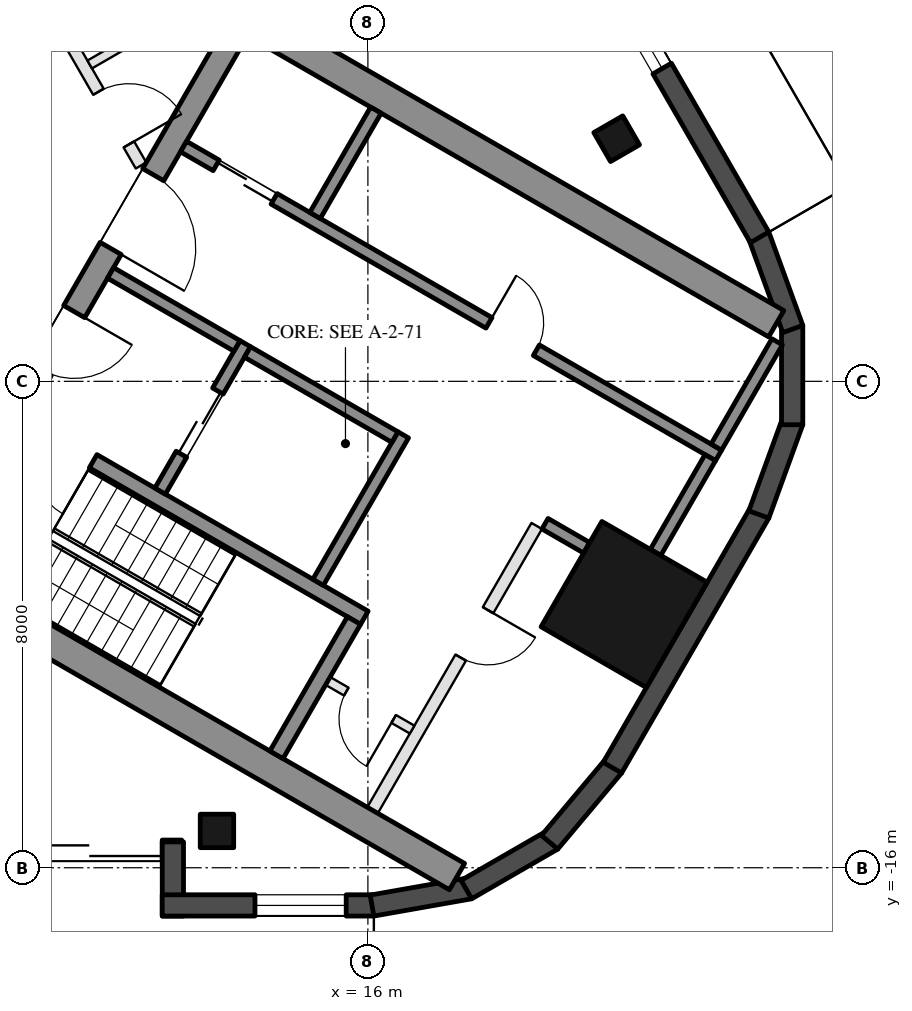
"""IFC4 building model, lengths in metres.
Left out: names, types, materials, properties, quantities, classifications, styles, units other than length and angle.
Written with IfcOpenShell. Run it as: python <this file> out.ifc"""

import sys

from ifc_helpers import new_model, si_unit, direction, frame, frame_2d, origin, origin_2d, place, context, subcontext, project, spatial, rectangle, hollow_rectangle, extrude, boolean, halfspace, element, fill, save


model = new_model("IFC4")
c1 = context("Model", 3, precision=1e-05, world=origin(), true_north=direction((0.0, 1.0)))
c2 = subcontext(c1, "Body", "Model", "MODEL_VIEW")
j1 = project(units=[si_unit("LENGTHUNIT", "METRE"), si_unit("PLANEANGLEUNIT", "RADIAN")], contexts=[c1])
p1 = place(None, origin())
s1 = spatial("IfcSite", under=j1, at=p1, CompositionType="ELEMENT")
p2 = place(p1, origin())
s2 = spatial("IfcBuilding", under=s1, at=p2, CompositionType="ELEMENT")
p3 = place(p2, frame((0.0, 0.0, 305.9)))
s3 = spatial("IfcBuildingStorey", under=s2, at=p3, CompositionType="ELEMENT", Elevation=305.9)
for number, where, z_axis, x_axis in (
    (1, (13.518, -15.395, 0.0), (0.0, 0.0, 1.0), (-1.0, 0.0, 0.0)),
    (2, (20.091, -4.01, 0.0), (0.0, 0.0, 1.0), (-0.5, 0.866, 0.0)),
):
    element("IfcColumn", number, at=place(p3, frame(where, z_axis=z_axis, x_axis=x_axis)), inside=s3, PredefinedType="COLUMN", context=c2, shape_type="SweptSolid", body=[
        boolean("DIFFERENCE", extrude(hollow_rectangle(XDim=0.55, YDim=0.55, WallThickness=0.025, at=origin_2d()), origin(), (0.0, 0.0, 1.0), 3.7), halfspace(frame((0.0, 0.0, 3.66), z_axis=(0.0, 0.0, 1.0), x_axis=(1.0, 0.0, 0.0)), False)),
    ])
p4 = place(p3, frame((20.214, -11.671, 0.0), z_axis=(0.0, 0.0, 1.0), x_axis=(0.5, 0.866025403784, 0.0)))
e3 = element("IfcColumn", 3, at=p4, inside=s3, PredefinedType="COLUMN", context=c2, shape_type="SweptSolid", body=[
    boolean("DIFFERENCE", extrude(hollow_rectangle(XDim=2.0, YDim=2.0, WallThickness=0.05, at=origin_2d()), origin(), (0.0, 0.0, 1.0), 3.7), halfspace(frame((0.0, 0.0, 3.587), z_axis=(0.0, 0.0, 1.0), x_axis=(1.0, 0.0, 0.0)), False)),
])
p5 = place(p3, frame((7.339, -15.719, 0.0), z_axis=(0.0, 0.0, 1.0), x_axis=(1.0, 0.0, 0.0)))
e4 = element("IfcWall", 4, at=p5, inside=s3, PredefinedType="SOLIDWALL", context=c2, shape_type="SweptSolid", body=[
    extrude(rectangle(XDim=5.599, YDim=0.35, at=frame_2d((2.799, 0.0))), origin(), (0.0, 0.0, 1.0), 3.55),
])
p6 = place(p5, frame((2.879, 0.0, 0.0)))
e5 = element("IfcOpeningElement", 5, at=p6, cuts=e4, PredefinedType="OPENING", context=c2, shape_type="SweptSolid", body=[
    extrude(rectangle(XDim=2.4, YDim=2.4, at=frame_2d((1.2, 1.2))), frame((0.0, 0.185, 0.0), z_axis=(0.0, -1.0, 0.0), x_axis=(1.0, 0.0, 0.0)), (0.0, 0.0, 1.0), 0.37),
])
p7 = place(p5, frame((0.831, 0.0, 0.3)))
e6 = element("IfcOpeningElement", 6, at=p7, cuts=e4, PredefinedType="OPENING", context=c2, shape_type="SweptSolid", body=[
    extrude(rectangle(XDim=1.7, YDim=2.65, at=frame_2d((0.85, 1.325))), frame((0.0, 0.185, 0.0), z_axis=(0.0, -1.0, 0.0), x_axis=(1.0, 0.0, 0.0)), (0.0, 0.0, 1.0), 0.37),
])
p8 = place(p3, frame((12.793, -15.575, 0.0), z_axis=(0.0, 0.0, 1.0), x_axis=(0.0, -1.0, 0.0)))
e7 = element("IfcWall", 7, at=p8, inside=s3, PredefinedType="SOLIDWALL", context=c2, shape_type="SweptSolid", body=[
    extrude(rectangle(XDim=1.22, YDim=0.35, at=frame_2d((0.61, 0.0))), origin(), (0.0, 0.0, 1.0), 3.55),
])
p9 = place(p3, frame((12.618, -16.62, 0.0), z_axis=(0.0, 0.0, 1.0), x_axis=(1.0, 0.0, 0.0)))
e8 = element("IfcWall", 8, at=p9, inside=s3, PredefinedType="SOLIDWALL", context=c2, shape_type="SweptSolid", body=[
    extrude(rectangle(XDim=3.48, YDim=0.35, at=frame_2d((1.74, 0.0))), origin(), (0.0, 0.0, 1.0), 3.55),
])
p10 = place(p9, frame((1.525, 0.0, 0.3)))
e9 = element("IfcOpeningElement", 9, at=p10, cuts=e8, PredefinedType="OPENING", context=c2, shape_type="SweptSolid", body=[
    extrude(rectangle(XDim=1.5, YDim=2.65, at=frame_2d((0.75, 1.325))), frame((0.0, 0.185, 0.0), z_axis=(0.0, -1.0, 0.0), x_axis=(1.0, 0.0, 0.0)), (0.0, 0.0, 1.0), 0.37),
])
p11 = place(p3, frame((16.068, -16.622, 0.0), z_axis=(0.0, 0.0, 1.0), x_axis=(0.98479107762, 0.173742721977, 0.0)))
e10 = element("IfcWall", 10, at=p11, inside=s3, PredefinedType="SOLIDWALL", context=c2, shape_type="SweptSolid", body=[
    extrude(rectangle(XDim=1.634, YDim=0.35, at=frame_2d((0.817, 0.0))), origin(), (0.0, 0.0, 1.0), 3.55),
])
p12 = place(p3, frame((17.62, -16.359, 0.0), z_axis=(0.0, 0.0, 1.0), x_axis=(0.866083589932, 0.499899205091, 0.0)))
e11 = element("IfcWall", 11, at=p12, inside=s3, PredefinedType="SOLIDWALL", context=c2, shape_type="SweptSolid", body=[
    extrude(rectangle(XDim=1.634, YDim=0.35, at=frame_2d((0.817, 0.0))), origin(), (0.0, 0.0, 1.0), 3.55),
])
p13 = place(p3, frame((18.989, -15.581, 0.0), z_axis=(0.0, 0.0, 1.0), x_axis=(0.642708448155, 0.766110860562, 0.0)))
e12 = element("IfcWall", 12, at=p13, inside=s3, PredefinedType="SOLIDWALL", context=c2, shape_type="SweptSolid", body=[
    extrude(rectangle(XDim=1.634, YDim=0.35, at=frame_2d((0.817, 0.0))), origin(), (0.0, 0.0, 1.0), 3.55),
])
p14 = place(p3, frame((20.021, -14.354, 0.0), z_axis=(0.0, 0.0, 1.0), x_axis=(0.500012048649, 0.866018447382, 0.0)))
e13 = element("IfcWall", 13, at=p14, inside=s3, PredefinedType="SOLIDWALL", context=c2, shape_type="SweptSolid", body=[
    extrude(rectangle(XDim=4.841, YDim=0.35, at=frame_2d((2.42, 0.0))), origin(), (0.0, 0.0, 1.0), 3.55),
])
for number, where, z_axis, x_axis in (
    (14, (22.429, -10.19, 0.0), (0.0, 0.0, 1.0), (0.342, 0.94, 0.0)),
    (15, (22.977, -8.714, 0.0), (0.0, 0.0, 1.0), (0.0, 1.0, 0.0)),
    (16, (22.988, -7.14, 0.0), (0.0, 0.0, 1.0), (-0.342, 0.94, 0.0)),
):
    element("IfcWall", number, at=place(p3, frame(where, z_axis=z_axis, x_axis=x_axis)), inside=s3, PredefinedType="SOLIDWALL", context=c2, shape_type="SweptSolid", body=[
        extrude(rectangle(XDim=1.634, YDim=0.35, at=frame_2d((0.817, 0.0))), origin(), (0.0, 0.0, 1.0), 3.55),
    ])
p15 = place(p3, frame((22.442, -5.632, 0.0), z_axis=(0.0, 0.0, 1.0), x_axis=(-0.499983205548, 0.866035099848, 0.0)))
e17 = element("IfcWall", 17, at=p15, inside=s3, PredefinedType="SOLIDWALL", context=c2, shape_type="SweptSolid", body=[
    extrude(rectangle(XDim=10.239, YDim=0.35, at=frame_2d((5.12, 0.0))), origin(), (0.0, 0.0, 1.0), 3.55),
])
p16 = place(p15, frame((5.32, 0.0, 0.0)))
e18 = element("IfcOpeningElement", 18, at=p16, cuts=e17, PredefinedType="OPENING", context=c2, shape_type="SweptSolid", body=[
    extrude(rectangle(XDim=2.4, YDim=2.4, at=frame_2d((1.2, 1.2))), frame((0.0, 0.185, 0.0), z_axis=(0.0, -1.0, 0.0), x_axis=(1.0, 0.0, 0.0)), (0.0, 0.0, 1.0), 0.37),
])
p17 = place(p15, frame((3.205, 0.0, 0.3)))
e19 = element("IfcOpeningElement", 19, at=p17, cuts=e17, PredefinedType="OPENING", context=c2, shape_type="SweptSolid", body=[
    extrude(rectangle(XDim=1.8, YDim=2.65, at=frame_2d((0.9, 1.325))), frame((0.0, 0.185, 0.0), z_axis=(0.0, -1.0, 0.0), x_axis=(1.0, 0.0, 0.0)), (0.0, 0.0, 1.0), 0.37),
])
for number, where, z_axis, x_axis in (
    (20, (8.547, -10.997, 0.0), (0.0, 0.0, 1.0), (0.866, -0.5, 0.0)),
    (21, (13.797, -1.903, 0.0), (0.0, 0.0, 1.0), (0.866, -0.5, 0.0)),
):
    element("IfcWall", number, at=place(p3, frame(where, z_axis=z_axis, x_axis=x_axis)), inside=s3, PredefinedType="SHEAR", context=c2, shape_type="SweptSolid", body=[
        extrude(rectangle(XDim=10.298, YDim=0.5, at=frame_2d((5.149, 0.0))), origin(), (0.0, 0.0, 1.0), 3.5),
    ])
p18 = place(p3, frame((8.845, -10.88, 0.0), z_axis=(0.0, 0.0, 1.0), x_axis=(0.500004234368, 0.866022959057, 0.0)))
e22 = element("IfcWall", 22, at=p18, inside=s3, PredefinedType="SHEAR", context=c2, shape_type="SweptSolid", body=[
    extrude(rectangle(XDim=10.0, YDim=0.4, at=frame_2d((5.0, 0.0))), origin(), (0.0, 0.0, 1.0), 3.5),
])
p19 = place(p18, frame((3.55, 0.0, 0.0)))
e23 = element("IfcOpeningElement", 23, at=p19, cuts=e22, PredefinedType="OPENING", context=c2, shape_type="SweptSolid", body=[
    extrude(rectangle(XDim=1.1, YDim=2.1, at=frame_2d((0.55, 1.05))), frame((0.0, 0.21, 0.0), z_axis=(0.0, -1.0, 0.0), x_axis=(1.0, 0.0, 0.0)), (0.0, 0.0, 1.0), 0.42),
])
p20 = place(p18, frame((5.85, 0.0, 0.0)))
e24 = element("IfcOpeningElement", 24, at=p20, cuts=e22, PredefinedType="OPENING", context=c2, shape_type="SweptSolid", body=[
    extrude(rectangle(XDim=1.4, YDim=2.1, at=frame_2d((0.7, 1.05))), frame((0.0, 0.21, 0.0), z_axis=(0.0, -1.0, 0.0), x_axis=(1.0, 0.0, 0.0)), (0.0, 0.0, 1.0), 0.42),
])
p21 = place(p3, frame((10.356, -8.664, 0.0), z_axis=(0.0, 0.0, 1.0), x_axis=(0.866028629588, -0.499994412703, 0.0)))
e25 = element("IfcWall", 25, at=p21, inside=s3, PredefinedType="SHEAR", context=c2, shape_type="SweptSolid", body=[
    extrude(rectangle(XDim=6.45, YDim=0.25, at=frame_2d((3.225, 0.0))), origin(), (0.0, 0.0, 1.0), 3.5),
])
p22 = place(p21, frame((0.3, 0.0, 0.0)))
e26 = element("IfcOpeningElement", 26, at=p22, cuts=e25, PredefinedType="OPENING", context=c2, shape_type="SweptSolid", body=[
    extrude(rectangle(XDim=1.0, YDim=2.1, at=frame_2d((0.5, 1.05))), frame((0.0, 0.135, 0.0), z_axis=(0.0, -1.0, 0.0), x_axis=(1.0, 0.0, 0.0)), (0.0, 0.0, 1.0), 0.27),
])
p23 = place(p3, frame((14.496, -14.143, 0.0), z_axis=(0.0, 0.0, 1.0), x_axis=(0.500062241894, 0.865989465428, 0.0)))
e27 = element("IfcWall", 27, at=p23, inside=s3, PredefinedType="SHEAR", context=c2, shape_type="SweptSolid", body=[
    extrude(rectangle(XDim=2.55, YDim=0.25, at=frame_2d((1.275, 0.0))), origin(), (0.0, 0.0, 1.0), 3.5),
])
p24 = place(p3, frame((15.181, -11.305, 0.0), z_axis=(0.0, 0.0, 1.0), x_axis=(0.49994636267, 0.866056369097, 0.0)))
e28 = element("IfcWall", 28, at=p24, inside=s3, PredefinedType="SHEAR", context=c2, shape_type="SweptSolid", body=[
    extrude(rectangle(XDim=2.8, YDim=0.2, at=frame_2d((1.4, 0.0))), origin(), (0.0, 0.0, 1.0), 3.5),
])
p25 = place(p3, frame((12.583, -9.805, 0.0), z_axis=(0.0, 0.0, 1.0), x_axis=(0.49994636267, 0.866056369097, 0.0)))
e29 = element("IfcWall", 29, at=p25, inside=s3, PredefinedType="SHEAR", context=c2, shape_type="SweptSolid", body=[
    extrude(rectangle(XDim=2.8, YDim=0.2, at=frame_2d((1.4, 0.0))), origin(), (0.0, 0.0, 1.0), 3.5),
])
p26 = place(p25, frame((0.7, 0.0, 0.0)))
e30 = element("IfcOpeningElement", 30, at=p26, cuts=e29, PredefinedType="OPENING", context=c2, shape_type="SweptSolid", body=[
    extrude(rectangle(XDim=1.2, YDim=2.1, at=frame_2d((0.6, 1.05))), frame((0.0, 0.11, 0.0), z_axis=(0.0, -1.0, 0.0), x_axis=(1.0, 0.0, 0.0)), (0.0, 0.0, 1.0), 0.22),
])
p27 = place(p3, frame((11.768, -6.217, 0.0), z_axis=(0.0, 0.0, 1.0), x_axis=(0.866050077142, -0.499957262057, 0.0)))
e31 = element("IfcWall", 31, at=p27, inside=s3, PredefinedType="SHEAR", context=c2, shape_type="SweptSolid", body=[
    extrude(rectangle(XDim=2.4, YDim=0.2, at=frame_2d((1.2, 0.0))), origin(), (0.0, 0.0, 1.0), 3.5),
])
p28 = place(p3, frame((14.02, -7.517, 0.0), z_axis=(0.0, 0.0, 1.0), x_axis=(0.866034573852, -0.49998411664, 0.0)))
e32 = element("IfcWall", 32, at=p28, inside=s3, PredefinedType="SHEAR", context=c2, shape_type="SweptSolid", body=[
    extrude(rectangle(XDim=2.8, YDim=0.2, at=frame_2d((1.4, 0.0))), origin(), (0.0, 0.0, 1.0), 3.5),
])
p29 = place(p3, frame((12.968, -4.138, 0.0), z_axis=(0.0, 0.0, 1.0), x_axis=(0.866028328073, -0.49999493495, 0.0)))
e33 = element("IfcWall", 33, at=p29, inside=s3, PredefinedType="SHEAR", context=c2, shape_type="SweptSolid", body=[
    extrude(rectangle(XDim=10.16, YDim=0.2, at=frame_2d((5.08, 0.0))), origin(), (0.0, 0.0, 1.0), 3.5),
])
p30 = place(p29, frame((0.62, 0.0, 0.0)))
e34 = element("IfcOpeningElement", 34, at=p30, cuts=e33, PredefinedType="OPENING", context=c2, shape_type="SweptSolid", body=[
    extrude(rectangle(XDim=1.1, YDim=2.1, at=frame_2d((0.55, 1.05))), frame((0.0, 0.11, 0.0), z_axis=(0.0, -1.0, 0.0), x_axis=(1.0, 0.0, 0.0)), (0.0, 0.0, 1.0), 0.22),
])
p31 = place(p29, frame((5.8, 0.0, 0.0)))
e35 = element("IfcOpeningElement", 35, at=p31, cuts=e33, PredefinedType="OPENING", context=c2, shape_type="SweptSolid", body=[
    extrude(rectangle(XDim=0.9, YDim=2.1, at=frame_2d((0.45, 1.05))), frame((0.0, 0.11, 0.0), z_axis=(0.0, -1.0, 0.0), x_axis=(1.0, 0.0, 0.0)), (0.0, 0.0, 1.0), 0.22),
])
p32 = place(p3, frame((20.73, -10.814, 0.0), z_axis=(0.0, 0.0, 1.0), x_axis=(0.499961193289, 0.866047807691, 0.0)))
e36 = element("IfcWall", 36, at=p32, inside=s3, PredefinedType="SHEAR", context=c2, shape_type="SweptSolid", body=[
    extrude(rectangle(XDim=1.8, YDim=0.2, at=frame_2d((0.9, 0.0))), origin(), (0.0, 0.0, 1.0), 3.5),
])
p33 = place(p3, frame((18.913, -10.342, 0.0), z_axis=(0.0, 0.0, 1.0), x_axis=(0.86597493103, -0.500087411186, 0.0)))
e37 = element("IfcWall", 37, at=p33, inside=s3, PredefinedType="SHEAR", context=c2, shape_type="SweptSolid", body=[
    extrude(rectangle(XDim=0.791, YDim=0.2, at=frame_2d((0.396, 0.0))), origin(), (0.0, 0.0, 1.0), 3.5),
])
for number, where, z_axis, x_axis in (
    (38, (15.131, -5.272, 0.0), (0.0, 0.0, 1.0), (0.5, 0.866, 0.0)),
    (39, (21.73, -9.082, 0.0), (0.0, 0.0, 1.0), (0.5, 0.866, 0.0)),
):
    element("IfcWall", number, at=place(p3, frame(where, z_axis=z_axis, x_axis=x_axis)), inside=s3, PredefinedType="SHEAR", context=c2, shape_type="SweptSolid", body=[
        extrude(rectangle(XDim=2.0, YDim=0.2, at=frame_2d((1.0, 0.0))), origin(), (0.0, 0.0, 1.0), 3.5),
    ])
p34 = place(p3, frame((16.076, -15.055, 0.0), z_axis=(0.0, 0.0, 1.0), x_axis=(0.499995103361, 0.866028230842, 0.0)))
e40 = element("IfcWall", 40, at=p34, inside=s3, PredefinedType="PARTITIONING", context=c2, shape_type="SweptSolid", body=[
    extrude(rectangle(XDim=5.4, YDim=0.2, at=frame_2d((2.7, 0.0))), origin(), (0.0, 0.0, 1.0), 3.5),
])
p35 = place(p34, frame((2.9, 0.0, 0.0)))
e41 = element("IfcOpeningElement", 41, at=p35, cuts=e40, PredefinedType="OPENING", context=c2, shape_type="SweptSolid", body=[
    extrude(rectangle(XDim=0.9, YDim=2.1, at=frame_2d((0.45, 1.05))), frame((0.0, 0.11, 0.0), z_axis=(0.0, -1.0, 0.0), x_axis=(1.0, 0.0, 0.0)), (0.0, 0.0, 1.0), 0.22),
])
p36 = place(p3, frame((15.342, -12.928, 0.0), z_axis=(0.0, 0.0, 1.0), x_axis=(0.865989903783, -0.500061482766, 0.0)))
e42 = element("IfcWall", 42, at=p36, inside=s3, PredefinedType="PARTITIONING", context=c2, shape_type="SweptSolid", body=[
    extrude(rectangle(XDim=1.6, YDim=0.15, at=frame_2d((0.8, 0.0))), origin(), (0.0, 0.0, 1.0), 3.5),
])
p37 = place(p36, frame((0.35, 0.0, 0.0)))
e43 = element("IfcOpeningElement", 43, at=p37, cuts=e42, PredefinedType="OPENING", context=c2, shape_type="SweptSolid", body=[
    extrude(rectangle(XDim=0.9, YDim=2.1, at=frame_2d((0.45, 1.05))), frame((0.0, 0.085, 0.0), z_axis=(0.0, -1.0, 0.0), x_axis=(1.0, 0.0, 0.0)), (0.0, 0.0, 1.0), 0.17),
])
p38 = place(p3, frame((10.365, -1.152, 0.0), z_axis=(0.0, 0.0, 1.0), x_axis=(0.499999897272, -0.866025463095, 0.0)))
e44 = element("IfcWall", 44, at=p38, inside=s3, PredefinedType="PARTITIONING", context=c2, shape_type="SweptSolid", body=[
    extrude(rectangle(XDim=3.809, YDim=0.2, at=frame_2d((1.904, 0.0))), origin(), (0.0, 0.0, 1.0), 3.1),
])
p39 = place(p38, frame((2.409, 0.0, 0.0)))
e45 = element("IfcOpeningElement", 45, at=p39, cuts=e44, PredefinedType="OPENING", context=c2, shape_type="SweptSolid", body=[
    extrude(rectangle(XDim=1.0, YDim=2.1, at=frame_2d((0.5, 1.05))), frame((0.0, 0.11, 0.0), z_axis=(0.0, -1.0, 0.0), x_axis=(1.0, 0.0, 0.0)), (0.0, 0.0, 1.0), 0.22),
])
p40 = place(p3, frame((11.425, -2.789, 0.0), z_axis=(0.0, 0.0, 1.0), x_axis=(0.865996816683, 0.500049511043, 0.0)))
e46 = element("IfcWall", 46, at=p40, inside=s3, PredefinedType="PARTITIONING", context=c2, shape_type="SweptSolid", body=[
    extrude(rectangle(XDim=2.8, YDim=0.15, at=frame_2d((1.4, 0.0))), origin(), (0.0, 0.0, 1.0), 3.55),
])
p41 = place(p40, frame((1.4, 0.0, 0.0)))
e47 = element("IfcOpeningElement", 47, at=p41, cuts=e46, PredefinedType="OPENING", context=c2, shape_type="SweptSolid", body=[
    extrude(rectangle(XDim=0.9, YDim=2.1, at=frame_2d((0.45, 1.05))), frame((0.0, 0.085, 0.0), z_axis=(0.0, -1.0, 0.0), x_axis=(1.0, 0.0, 0.0)), (0.0, 0.0, 1.0), 0.17),
])
p42 = place(p6, frame((2.4, 0.0, 0.0), z_axis=(0.0, 0.0, 1.0), x_axis=(-1.0, 0.0, 0.0)))
e48 = element("IfcDoor", 48, at=p42, inside=s3, OperationType="SLIDING_TO_LEFT", PredefinedType="DOOR", context=c2, shape_type="SweptSolid", body=[
    extrude(rectangle(XDim=2.4, YDim=2.4, at=frame_2d((1.2, 1.2))), frame((0.0, 0.025, 0.0), z_axis=(0.0, -1.0, 0.0), x_axis=(1.0, 0.0, 0.0)), (0.0, 0.0, 1.0), 0.05),
])
fill(e5, e48)
p43 = place(p10, origin())
e49 = element("IfcWindow", 49, at=p43, inside=s3, PartitioningType="SINGLE_PANEL", PredefinedType="WINDOW", context=c2, shape_type="SweptSolid", body=[
    extrude(rectangle(XDim=1.5, YDim=2.65, at=frame_2d((0.75, 1.325))), frame((0.0, 0.03, 0.0), z_axis=(0.0, -1.0, 0.0), x_axis=(1.0, 0.0, 0.0)), (0.0, 0.0, 1.0), 0.06),
])
fill(e9, e49)
p44 = place(p17, origin())
e50 = element("IfcWindow", 50, at=p44, inside=s3, PartitioningType="SINGLE_PANEL", PredefinedType="WINDOW", context=c2, shape_type="SweptSolid", body=[
    extrude(rectangle(XDim=1.8, YDim=2.65, at=frame_2d((0.9, 1.325))), frame((0.0, 0.03, 0.0), z_axis=(0.0, -1.0, 0.0), x_axis=(1.0, 0.0, 0.0)), (0.0, 0.0, 1.0), 0.06),
])
fill(e19, e50)
p45 = place(p26, origin())
e51 = element("IfcDoor", 51, at=p45, inside=s3, OperationType="DOUBLE_DOOR_SLIDING", PredefinedType="DOOR", context=c2, shape_type="SweptSolid", body=[
    extrude(rectangle(XDim=1.2, YDim=2.1, at=frame_2d((0.6, 1.05))), frame((0.0, 0.025, 0.0), z_axis=(0.0, -1.0, 0.0), x_axis=(1.0, 0.0, 0.0)), (0.0, 0.0, 1.0), 0.05),
])
fill(e30, e51)
p46 = place(p37, frame((0.9, 0.0, 0.0), z_axis=(0.0, 0.0, 1.0), x_axis=(-1.0, 0.0, 0.0)))
e52 = element("IfcDoor", 52, at=p46, inside=s3, OperationType="SINGLE_SWING_LEFT", PredefinedType="DOOR", context=c2, shape_type="SweptSolid", body=[
    extrude(rectangle(XDim=0.9, YDim=2.1, at=frame_2d((0.45, 1.05))), frame((0.0, 0.025, 0.0), z_axis=(0.0, -1.0, 0.0), x_axis=(1.0, 0.0, 0.0)), (0.0, 0.0, 1.0), 0.05),
])
fill(e43, e52)
p47 = place(p30, origin())
e53 = element("IfcDoor", 53, at=p47, inside=s3, OperationType="DOUBLE_DOOR_SLIDING", PredefinedType="DOOR", context=c2, shape_type="SweptSolid", body=[
    extrude(rectangle(XDim=1.1, YDim=2.1, at=frame_2d((0.55, 1.05))), frame((0.0, 0.025, 0.0), z_axis=(0.0, -1.0, 0.0), x_axis=(1.0, 0.0, 0.0)), (0.0, 0.0, 1.0), 0.05),
])
fill(e34, e53)
p48 = place(p31, origin())
e54 = element("IfcDoor", 54, at=p48, inside=s3, OperationType="SINGLE_SWING_LEFT", PredefinedType="DOOR", context=c2, shape_type="SweptSolid", body=[
    extrude(rectangle(XDim=0.9, YDim=2.1, at=frame_2d((0.45, 1.05))), frame((0.0, 0.025, 0.0), z_axis=(0.0, -1.0, 0.0), x_axis=(1.0, 0.0, 0.0)), (0.0, 0.0, 1.0), 0.05),
])
fill(e35, e54)
p49 = place(p35, frame((0.9, 0.0, 0.0), z_axis=(0.0, 0.0, 1.0), x_axis=(-1.0, 0.0, 0.0)))
e55 = element("IfcDoor", 55, at=p49, inside=s3, OperationType="SINGLE_SWING_LEFT", PredefinedType="DOOR", context=c2, shape_type="SweptSolid", body=[
    extrude(rectangle(XDim=0.9, YDim=2.1, at=frame_2d((0.45, 1.05))), frame((0.0, 0.025, 0.0), z_axis=(0.0, -1.0, 0.0), x_axis=(1.0, 0.0, 0.0)), (0.0, 0.0, 1.0), 0.05),
])
fill(e41, e55)
p50 = place(p19, frame((1.1, 0.0, 0.0), z_axis=(0.0, 0.0, 1.0), x_axis=(-1.0, 0.0, 0.0)))
e56 = element("IfcDoor", 56, at=p50, inside=s3, OperationType="SINGLE_SWING_LEFT", PredefinedType="DOOR", context=c2, shape_type="SweptSolid", body=[
    extrude(rectangle(XDim=1.1, YDim=2.1, at=frame_2d((0.55, 1.05))), frame((0.0, 0.025, 0.0), z_axis=(0.0, -1.0, 0.0), x_axis=(1.0, 0.0, 0.0)), (0.0, 0.0, 1.0), 0.05),
])
fill(e23, e56)
p51 = place(p20, frame((1.4, 0.0, 0.0), z_axis=(0.0, 0.0, 1.0), x_axis=(-1.0, 0.0, 0.0)))
e57 = element("IfcDoor", 57, at=p51, inside=s3, OperationType="DOUBLE_DOOR_SINGLE_SWING", PredefinedType="DOOR", context=c2, shape_type="SweptSolid", body=[
    extrude(rectangle(XDim=1.4, YDim=2.1, at=frame_2d((0.7, 1.05))), frame((0.0, 0.025, 0.0), z_axis=(0.0, -1.0, 0.0), x_axis=(1.0, 0.0, 0.0)), (0.0, 0.0, 1.0), 0.05),
])
fill(e24, e57)
p52 = place(p22, frame((1.0, 0.0, 0.0), z_axis=(0.0, 0.0, 1.0), x_axis=(-1.0, 0.0, 0.0)))
e58 = element("IfcDoor", 58, at=p52, inside=s3, OperationType="SINGLE_SWING_LEFT", PredefinedType="DOOR", context=c2, shape_type="SweptSolid", body=[
    extrude(rectangle(XDim=1.0, YDim=2.1, at=frame_2d((0.5, 1.05))), frame((0.0, 0.025, 0.0), z_axis=(0.0, -1.0, 0.0), x_axis=(1.0, 0.0, 0.0)), (0.0, 0.0, 1.0), 0.05),
])
fill(e26, e58)
p53 = place(p39, origin())
e59 = element("IfcDoor", 59, at=p53, inside=s3, OperationType="SINGLE_SWING_RIGHT", PredefinedType="DOOR", context=c2, shape_type="SweptSolid", body=[
    extrude(rectangle(XDim=1.0, YDim=2.1, at=frame_2d((0.5, 1.05))), frame((0.0, 0.025, 0.0), z_axis=(0.0, -1.0, 0.0), x_axis=(1.0, 0.0, 0.0)), (0.0, 0.0, 1.0), 0.05),
])
fill(e45, e59)
save(model, sys.argv[1])
